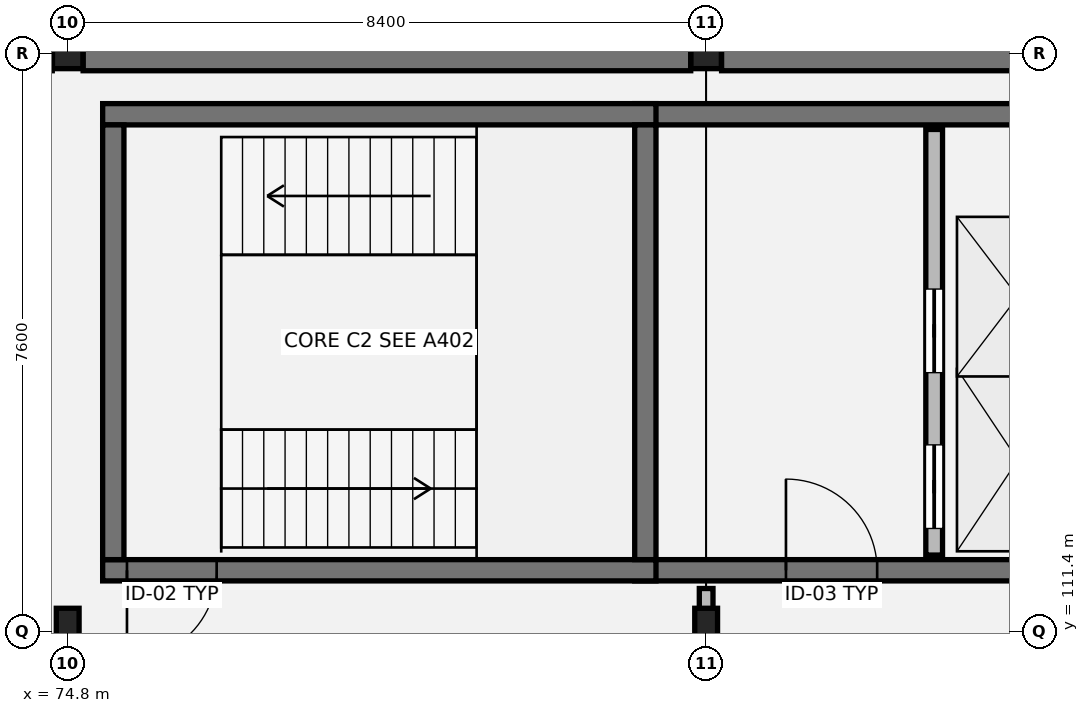
"""IFC4 building model, lengths in metres.
Left out: names, types, materials, properties, quantities, classifications, styles, units other than length and angle.
Written with IfcOpenShell. Run it as: python <this file> out.ifc"""

import sys

from ifc_helpers import new_model, si_unit, direction, frame, frame_2d, origin, origin_2d, place, context, subcontext, project, spatial, rectangle, hollow_rectangle, i_section, extrude, element, fill, save


model = new_model("IFC4")
c1 = context("Model", 3, precision=1e-05, world=origin(), true_north=direction((0.0, 1.0)))
c2 = subcontext(c1, "Body", "Model", "MODEL_VIEW")
j1 = project(units=[si_unit("LENGTHUNIT", "METRE"), si_unit("PLANEANGLEUNIT", "RADIAN")], contexts=[c1])
p1 = place(None, origin())
s1 = spatial("IfcSite", under=j1, at=p1, CompositionType="ELEMENT")
p2 = place(p1, origin())
s2 = spatial("IfcBuilding", under=s1, at=p2, CompositionType="ELEMENT")
p3 = place(p2, frame((0.0, 0.0, -4.42)))
s3 = spatial("IfcBuildingStorey", under=s2, at=p3, CompositionType="ELEMENT", Elevation=-4.42)
p4 = place(p3, frame((74.8, 111.4, 0.0), z_axis=(0.0, 0.0, 1.0), x_axis=(1.0, 0.0, 0.0)))
e1 = element("IfcColumn", 1, at=p4, inside=s3, PredefinedType="COLUMN", context=c2, shape_type="SweptSolid", body=[
    extrude(i_section(OverallWidth=0.3, OverallDepth=0.6, WebThickness=0.015, FlangeThickness=0.03, at=origin_2d()), origin(), (0.0, 0.0, 1.0), 4.395),
])
p5 = place(p3, frame((74.8, 119.0, 0.0), z_axis=(0.0, 0.0, 1.0), x_axis=(1.0, 0.0, 0.0)))
e2 = element("IfcColumn", 2, at=p5, inside=s3, PredefinedType="COLUMN", context=c2, shape_type="SweptSolid", body=[
    extrude(hollow_rectangle(XDim=0.4, YDim=0.4, WallThickness=0.016, at=origin_2d()), origin(), (0.0, 0.0, 1.0), 4.395),
])
p6 = place(p3, frame((83.2, 111.4, 0.0), z_axis=(0.0, 0.0, 1.0), x_axis=(1.0, 0.0, 0.0)))
e3 = element("IfcColumn", 3, at=p6, inside=s3, PredefinedType="COLUMN", context=c2, shape_type="SweptSolid", body=[
    extrude(i_section(OverallWidth=0.3, OverallDepth=0.6, WebThickness=0.015, FlangeThickness=0.03, at=origin_2d()), origin(), (0.0, 0.0, 1.0), 4.395),
])
p7 = place(p3, frame((83.2, 119.0, 0.0), z_axis=(0.0, 0.0, 1.0), x_axis=(1.0, 0.0, 0.0)))
e4 = element("IfcColumn", 4, at=p7, inside=s3, PredefinedType="COLUMN", context=c2, shape_type="SweptSolid", body=[
    extrude(hollow_rectangle(XDim=0.4, YDim=0.4, WallThickness=0.016, at=origin_2d()), origin(), (0.0, 0.0, 1.0), 4.395),
])
p8 = place(p3, frame((75.003, 119.0, 0.0), z_axis=(0.0, 0.0, 1.0), x_axis=(1.0, 0.0, 0.0)))
e5 = element("IfcWall", 5, at=p8, inside=s3, PredefinedType="USERDEFINED", context=c2, shape_type="SweptSolid", body=[
    extrude(rectangle(XDim=7.994, YDim=0.455, at=frame_2d((3.997, 0.0))), origin(), (0.0, 0.0, 1.0), 3.82),
])
p9 = place(p3, frame((83.403, 119.0, 0.0), z_axis=(0.0, 0.0, 1.0), x_axis=(1.0, 0.0, 0.0)))
e6 = element("IfcWall", 6, at=p9, inside=s3, PredefinedType="USERDEFINED", context=c2, shape_type="SweptSolid", body=[
    extrude(rectangle(XDim=7.994, YDim=0.455, at=frame_2d((3.997, 0.0))), origin(), (0.0, 0.0, 1.0), 3.82),
])
p10 = place(p3, frame((82.26, 112.2, 0.0), z_axis=(0.0, 0.0, 1.0), x_axis=(1.0, 0.0, 0.0)))
e7 = element("IfcWall", 7, at=p10, inside=s3, PredefinedType="SHEAR", context=c2, shape_type="SweptSolid", body=[
    extrude(rectangle(XDim=6.33, YDim=0.28, at=frame_2d((3.165, 0.0))), origin(), (0.0, 0.0, 1.0), 4.185),
])
p11 = place(p10, frame((1.99, 0.0, 0.0)))
e8 = element("IfcOpeningElement", 8, at=p11, cuts=e7, PredefinedType="OPENING", context=c2, shape_type="SweptSolid", body=[
    extrude(rectangle(XDim=1.2, YDim=2.16, at=frame_2d((0.6, 1.08))), frame((0.0, 0.15, 0.0), z_axis=(0.0, -1.0, 0.0), x_axis=(1.0, 0.0, 0.0)), (0.0, 0.0, 1.0), 0.3),
])
p12 = place(p3, frame((88.59, 118.2, 0.0), z_axis=(0.0, 0.0, 1.0), x_axis=(-1.0, 0.0, 0.0)))
e9 = element("IfcWall", 9, at=p12, inside=s3, PredefinedType="SHEAR", context=c2, shape_type="SweptSolid", body=[
    extrude(rectangle(XDim=6.33, YDim=0.28, at=frame_2d((3.165, 0.0))), origin(), (0.0, 0.0, 1.0), 4.185),
])
p13 = place(p3, frame((86.2, 112.4, 0.0), z_axis=(0.0, 0.0, 1.0), x_axis=(0.0, 1.0, 0.0)))
e10 = element("IfcWall", 10, at=p13, inside=s3, PredefinedType="SOLIDWALL", context=c2, shape_type="SweptSolid", body=[
    extrude(rectangle(XDim=5.6, YDim=0.22, at=frame_2d((2.8, 0.0))), origin(), (0.0, 0.0, 1.0), 4.185),
])
p14 = place(p13, frame((0.35, 0.0, 0.0)))
e11 = element("IfcOpeningElement", 11, at=p14, cuts=e10, PredefinedType="OPENING", context=c2, shape_type="SweptSolid", body=[
    extrude(rectangle(XDim=1.1, YDim=2.15, at=frame_2d((0.55, 1.075))), frame((0.0, 0.12, 0.0), z_axis=(0.0, -1.0, 0.0), x_axis=(1.0, 0.0, 0.0)), (0.0, 0.0, 1.0), 0.24),
])
p15 = place(p13, frame((2.4, 0.0, 0.0)))
e12 = element("IfcOpeningElement", 12, at=p15, cuts=e10, PredefinedType="OPENING", context=c2, shape_type="SweptSolid", body=[
    extrude(rectangle(XDim=1.1, YDim=2.15, at=frame_2d((0.55, 1.075))), frame((0.0, 0.12, 0.0), z_axis=(0.0, -1.0, 0.0), x_axis=(1.0, 0.0, 0.0)), (0.0, 0.0, 1.0), 0.24),
])
p16 = place(p3, frame((75.26, 112.2, 0.0), z_axis=(0.0, 0.0, 1.0), x_axis=(1.0, 0.0, 0.0)))
e13 = element("IfcWall", 13, at=p16, inside=s3, PredefinedType="SHEAR", context=c2, shape_type="SweptSolid", body=[
    extrude(rectangle(XDim=7.28, YDim=0.28, at=frame_2d((3.64, 0.0))), origin(), (0.0, 0.0, 1.0), 4.185),
])
p17 = place(p16, frame((0.32, 0.0, 0.0)))
e14 = element("IfcOpeningElement", 14, at=p17, cuts=e13, PredefinedType="OPENING", context=c2, shape_type="SweptSolid", body=[
    extrude(rectangle(XDim=1.18, YDim=2.18, at=frame_2d((0.59, 1.09))), frame((0.0, 0.15, 0.0), z_axis=(0.0, -1.0, 0.0), x_axis=(1.0, 0.0, 0.0)), (0.0, 0.0, 1.0), 0.3),
])
p18 = place(p3, frame((75.26, 118.2, 0.0), z_axis=(0.0, 0.0, 1.0), x_axis=(1.0, 0.0, 0.0)))
e15 = element("IfcWall", 15, at=p18, inside=s3, PredefinedType="SHEAR", context=c2, shape_type="SweptSolid", body=[
    extrude(rectangle(XDim=7.28, YDim=0.28, at=frame_2d((3.64, 0.0))), origin(), (0.0, 0.0, 1.0), 4.185),
])
for number, where, z_axis, x_axis in (
    (16, (75.4, 112.34, 0.0), (0.0, 0.0, 1.0), (0.0, 1.0, 0.0)),
    (17, (82.4, 112.34, 0.0), (0.0, 0.0, 1.0), (0.0, 1.0, 0.0)),
):
    element("IfcWall", number, at=place(p3, frame(where, z_axis=z_axis, x_axis=x_axis)), inside=s3, PredefinedType="SHEAR", context=c2, shape_type="SweptSolid", body=[
        extrude(rectangle(XDim=5.72, YDim=0.28, at=frame_2d((2.86, 0.0))), origin(), (0.0, 0.0, 1.0), 4.185),
    ])
p19 = place(p3, frame((83.2, 111.64, 0.0), z_axis=(0.0, 0.0, 1.0), x_axis=(0.0, 1.0, 0.0)))
e18 = element("IfcWall", 18, at=p19, inside=s3, PredefinedType="PARTITIONING", context=c2, shape_type="SweptSolid", body=[
    extrude(rectangle(XDim=0.32, YDim=0.18, at=frame_2d((0.16, 0.0))), origin(), (0.0, 0.0, 1.0), 3.52),
])
p20 = place(p11, origin())
e19 = element("IfcDoor", 19, at=p20, inside=s3, OperationType="SINGLE_SWING_LEFT", PredefinedType="DOOR", context=c2, shape_type="SweptSolid", body=[
    extrude(rectangle(XDim=1.2, YDim=2.16, at=frame_2d((0.6, 1.08))), frame((0.0, 0.025, 0.0), z_axis=(0.0, -1.0, 0.0), x_axis=(1.0, 0.0, 0.0)), (0.0, 0.0, 1.0), 0.05),
])
fill(e8, e19)
p21 = place(p14, origin())
e20 = element("IfcDoor", 20, at=p21, inside=s3, OperationType="SLIDING_TO_LEFT", PredefinedType="DOOR", context=c2, shape_type="SweptSolid", body=[
    extrude(rectangle(XDim=1.1, YDim=2.15, at=frame_2d((0.55, 1.075))), frame((0.0, 0.025, 0.0), z_axis=(0.0, -1.0, 0.0), x_axis=(1.0, 0.0, 0.0)), (0.0, 0.0, 1.0), 0.05),
])
fill(e11, e20)
p22 = place(p15, origin())
e21 = element("IfcDoor", 21, at=p22, inside=s3, OperationType="SLIDING_TO_LEFT", PredefinedType="DOOR", context=c2, shape_type="SweptSolid", body=[
    extrude(rectangle(XDim=1.1, YDim=2.15, at=frame_2d((0.55, 1.075))), frame((0.0, 0.025, 0.0), z_axis=(0.0, -1.0, 0.0), x_axis=(1.0, 0.0, 0.0)), (0.0, 0.0, 1.0), 0.05),
])
fill(e12, e21)
p23 = place(p17, origin())
e22 = element("IfcDoor", 22, at=p23, inside=s3, OperationType="SINGLE_SWING_RIGHT", PredefinedType="DOOR", context=c2, shape_type="SweptSolid", body=[
    extrude(rectangle(XDim=1.18, YDim=2.18, at=frame_2d((0.59, 1.09))), frame((0.0, 0.025, 0.0), z_axis=(0.0, -1.0, 0.0), x_axis=(1.0, 0.0, 0.0)), (0.0, 0.0, 1.0), 0.05),
])
fill(e14, e22)
save(model, sys.argv[1])
